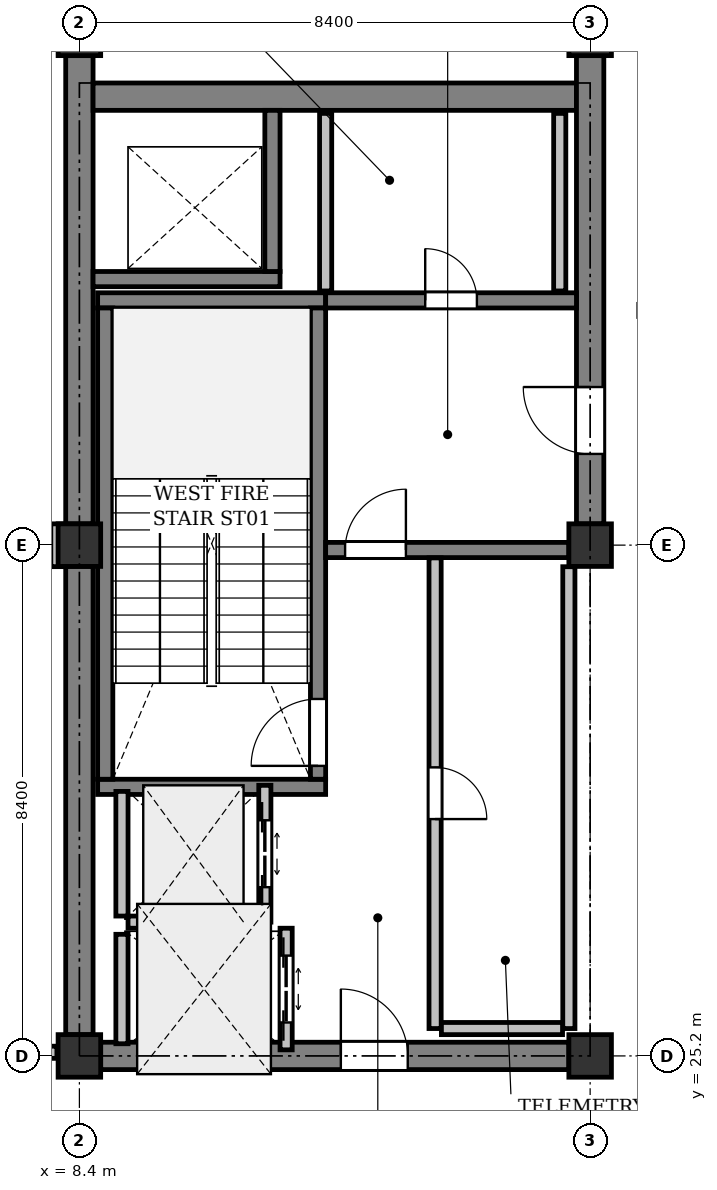
"""IFC4 building model, lengths in metres.
Left out: names, types, materials, properties, quantities, classifications, styles, units other than length and angle.
Written with IfcOpenShell. Run it as: python <this file> out.ifc"""

import sys

from ifc_helpers import new_model, si_unit, direction, frame, frame_2d, origin, origin_2d, place, context, subcontext, project, spatial, rectangle, extrude, element, fill, save


model = new_model("IFC4")
c1 = context("Model", 3, precision=1e-05, world=origin(), true_north=direction((0.0, 1.0)))
c2 = subcontext(c1, "Body", "Model", "MODEL_VIEW")
j1 = project(units=[si_unit("LENGTHUNIT", "METRE"), si_unit("PLANEANGLEUNIT", "RADIAN")], contexts=[c1])
p1 = place(None, origin())
s1 = spatial("IfcSite", under=j1, at=p1, CompositionType="ELEMENT")
p2 = place(p1, origin())
s2 = spatial("IfcBuilding", under=s1, at=p2, CompositionType="ELEMENT")
p3 = place(p2, frame((0.0, 0.0, 322.2)))
s3 = spatial("IfcBuildingStorey", under=s2, at=p3, CompositionType="ELEMENT", Elevation=322.2)
for number, where, z_axis, x_axis in (
    (1, (8.4, 25.2, 0.0), (0.0, 0.0, 1.0), (1.0, 0.0, 0.0)),
    (2, (8.4, 33.6, 0.0), (0.0, 0.0, 1.0), (1.0, 0.0, 0.0)),
    (3, (8.4, 42.0, 0.0), (0.0, 0.0, 1.0), (1.0, 0.0, 0.0)),
    (4, (16.8, 25.2, 0.0), (0.0, 0.0, 1.0), (1.0, 0.0, 0.0)),
    (5, (16.8, 33.6, 0.0), (0.0, 0.0, 1.0), (1.0, 0.0, 0.0)),
    (6, (16.8, 42.0, 0.0), (0.0, 0.0, 1.0), (1.0, 0.0, 0.0)),
):
    element("IfcColumn", number, at=place(p3, frame(where, z_axis=z_axis, x_axis=x_axis)), inside=s3, PredefinedType="COLUMN", context=c2, shape_type="SweptSolid", body=[
        extrude(rectangle(XDim=0.7, YDim=0.7, at=origin_2d()), origin(), (0.0, 0.0, 1.0), 4.8),
    ])
for number, where, z_axis, x_axis in (
    (7, (8.4, 25.55, 0.0), (0.0, 0.0, 1.0), (0.0, 1.0, 0.0)),
    (8, (8.4, 33.95, 0.0), (0.0, 0.0, 1.0), (0.0, 1.0, 0.0)),
):
    element("IfcWall", number, at=place(p3, frame(where, z_axis=z_axis, x_axis=x_axis)), inside=s3, PredefinedType="SHEAR", context=c2, shape_type="SweptSolid", body=[
        extrude(rectangle(XDim=7.7, YDim=0.45, at=frame_2d((3.85, 0.0))), origin(), (0.0, 0.0, 1.0), 4.45),
    ])
p4 = place(p3, frame((8.625, 40.975, 0.0), z_axis=(0.0, 0.0, 1.0), x_axis=(1.0, 0.0, 0.0)))
e9 = element("IfcWall", 9, at=p4, inside=s3, PredefinedType="SHEAR", context=c2, shape_type="SweptSolid", body=[
    extrude(rectangle(XDim=7.95, YDim=0.45, at=frame_2d((3.975, 0.0))), origin(), (0.0, 0.0, 1.0), 4.45),
])
p5 = place(p3, frame((16.8, 33.95, 0.0), z_axis=(0.0, 0.0, 1.0), x_axis=(0.0, 1.0, 0.0)))
e10 = element("IfcWall", 10, at=p5, inside=s3, PredefinedType="SHEAR", context=c2, shape_type="SweptSolid", body=[
    extrude(rectangle(XDim=7.7, YDim=0.45, at=frame_2d((3.85, 0.0))), origin(), (0.0, 0.0, 1.0), 4.45),
])
p6 = place(p5, frame((1.15, 0.0, 0.0)))
e11 = element("IfcOpeningElement", 11, at=p6, cuts=e10, PredefinedType="OPENING", context=c2, shape_type="SweptSolid", body=[
    extrude(rectangle(XDim=1.1, YDim=2.15, at=frame_2d((0.55, 1.075))), frame((0.0, 0.235, 0.0), z_axis=(0.0, -1.0, 0.0), x_axis=(1.0, 0.0, 0.0)), (0.0, 0.0, 1.0), 0.47),
])
p7 = place(p3, frame((8.75, 25.2, 0.0), z_axis=(0.0, 0.0, 1.0), x_axis=(1.0, 0.0, 0.0)))
e12 = element("IfcWall", 12, at=p7, inside=s3, PredefinedType="SHEAR", context=c2, shape_type="SweptSolid", body=[
    extrude(rectangle(XDim=7.7, YDim=0.45, at=frame_2d((3.85, 0.0))), origin(), (0.0, 0.0, 1.0), 4.45),
])
p8 = place(p7, frame((3.95, 0.0, 0.0)))
e13 = element("IfcOpeningElement", 13, at=p8, cuts=e12, PredefinedType="OPENING", context=c2, shape_type="SweptSolid", body=[
    extrude(rectangle(XDim=1.1, YDim=2.15, at=frame_2d((0.55, 1.075))), frame((0.0, 0.235, 0.0), z_axis=(0.0, -1.0, 0.0), x_axis=(1.0, 0.0, 0.0)), (0.0, 0.0, 1.0), 0.47),
])
for number, where, z_axis, x_axis in (
    (14, (12.45, 29.625, 0.0), (0.0, 0.0, 1.0), (-1.0, 0.0, 0.0)),
    (15, (12.45, 37.625, 0.0), (0.0, 0.0, 1.0), (-1.0, 0.0, 0.0)),
):
    element("IfcWall", number, at=place(p3, frame(where, z_axis=z_axis, x_axis=x_axis)), inside=s3, PredefinedType="SHEAR", context=c2, shape_type="SweptSolid", body=[
        extrude(rectangle(XDim=3.75, YDim=0.25, at=frame_2d((1.875, 0.0))), origin(), (0.0, 0.0, 1.0), 4.45),
    ])
p9 = place(p3, frame((12.325, 29.75, 0.0), z_axis=(0.0, 0.0, 1.0), x_axis=(0.0, 1.0, 0.0)))
e16 = element("IfcWall", 16, at=p9, inside=s3, PredefinedType="SHEAR", context=c2, shape_type="SweptSolid", body=[
    extrude(rectangle(XDim=7.75, YDim=0.25, at=frame_2d((3.875, 0.0))), origin(), (0.0, 0.0, 1.0), 4.45),
])
p10 = place(p9, frame((0.22, 0.0, 0.0)))
e17 = element("IfcOpeningElement", 17, at=p10, cuts=e16, PredefinedType="OPENING", context=c2, shape_type="SweptSolid", body=[
    extrude(rectangle(XDim=1.1, YDim=2.15, at=frame_2d((0.55, 1.075))), frame((0.0, 0.135, 0.0), z_axis=(0.0, -1.0, 0.0), x_axis=(1.0, 0.0, 0.0)), (0.0, 0.0, 1.0), 0.27),
])
p11 = place(p3, frame((8.825, 29.75, 0.0), z_axis=(0.0, 0.0, 1.0), x_axis=(0.0, 1.0, 0.0)))
e18 = element("IfcWall", 18, at=p11, inside=s3, PredefinedType="SHEAR", context=c2, shape_type="SweptSolid", body=[
    extrude(rectangle(XDim=7.75, YDim=0.25, at=frame_2d((3.875, 0.0))), origin(), (0.0, 0.0, 1.0), 4.45),
])
p12 = place(p3, frame((8.625, 37.975, 0.0), z_axis=(0.0, 0.0, 1.0), x_axis=(1.0, 0.0, 0.0)))
e19 = element("IfcWall", 19, at=p12, inside=s3, PredefinedType="SHEAR", context=c2, shape_type="SweptSolid", body=[
    extrude(rectangle(XDim=3.075, YDim=0.25, at=frame_2d((1.538, 0.0))), origin(), (0.0, 0.0, 1.0), 4.45),
])
p13 = place(p3, frame((11.575, 38.1, 0.0), z_axis=(0.0, 0.0, 1.0), x_axis=(0.0, 1.0, 0.0)))
e20 = element("IfcWall", 20, at=p13, inside=s3, PredefinedType="SHEAR", context=c2, shape_type="SweptSolid", body=[
    extrude(rectangle(XDim=2.65, YDim=0.25, at=frame_2d((1.325, 0.0))), origin(), (0.0, 0.0, 1.0), 4.45),
])
p14 = place(p3, frame((12.45, 33.52, 0.0), z_axis=(0.0, 0.0, 1.0), x_axis=(1.0, 0.0, 0.0)))
e21 = element("IfcWall", 21, at=p14, inside=s3, PredefinedType="SHEAR", context=c2, shape_type="SweptSolid", body=[
    extrude(rectangle(XDim=4.0, YDim=0.25, at=frame_2d((2.0, 0.0))), origin(), (0.0, 0.0, 1.0), 4.45),
])
p15 = place(p14, frame((0.32, 0.0, 0.0)))
e22 = element("IfcOpeningElement", 22, at=p15, cuts=e21, PredefinedType="OPENING", context=c2, shape_type="SweptSolid", body=[
    extrude(rectangle(XDim=1.0, YDim=2.15, at=frame_2d((0.5, 1.075))), frame((0.0, 0.135, 0.0), z_axis=(0.0, -1.0, 0.0), x_axis=(1.0, 0.0, 0.0)), (0.0, 0.0, 1.0), 0.27),
])
p16 = place(p3, frame((12.45, 37.625, 0.0), z_axis=(0.0, 0.0, 1.0), x_axis=(1.0, 0.0, 0.0)))
e23 = element("IfcWall", 23, at=p16, inside=s3, PredefinedType="SHEAR", context=c2, shape_type="SweptSolid", body=[
    extrude(rectangle(XDim=4.125, YDim=0.25, at=frame_2d((2.062, 0.0))), origin(), (0.0, 0.0, 1.0), 4.45),
])
p17 = place(p16, frame((1.637, 0.0, 0.0)))
e24 = element("IfcOpeningElement", 24, at=p17, cuts=e23, PredefinedType="OPENING", context=c2, shape_type="SweptSolid", body=[
    extrude(rectangle(XDim=0.85, YDim=2.15, at=frame_2d((0.425, 1.075))), frame((0.0, 0.135, 0.0), z_axis=(0.0, -1.0, 0.0), x_axis=(1.0, 0.0, 0.0)), (0.0, 0.0, 1.0), 0.27),
])
p18 = place(p3, frame((11.45, 27.4, 0.0), z_axis=(0.0, 0.0, 1.0), x_axis=(0.0, 1.0, 0.0)))
e25 = element("IfcWall", 25, at=p18, inside=s3, PredefinedType="PARTITIONING", context=c2, shape_type="SweptSolid", body=[
    extrude(rectangle(XDim=2.25, YDim=0.2, at=frame_2d((1.125, 0.0))), origin(), (0.0, 0.0, 1.0), 4.45),
])
p19 = place(p18, frame((0.575, 0.0, 0.0)))
e26 = element("IfcOpeningElement", 26, at=p19, cuts=e25, PredefinedType="OPENING", context=c2, shape_type="SweptSolid", body=[
    extrude(rectangle(XDim=1.1, YDim=2.2, at=frame_2d((0.55, 1.1))), frame((0.0, 0.11, 0.0), z_axis=(0.0, -1.0, 0.0), x_axis=(1.0, 0.0, 0.0)), (0.0, 0.0, 1.0), 0.22),
])
p20 = place(p3, frame((9.1, 27.5, 0.0), z_axis=(0.0, 0.0, 1.0), x_axis=(0.0, 1.0, 0.0)))
e27 = element("IfcWall", 27, at=p20, inside=s3, PredefinedType="PARTITIONING", context=c2, shape_type="SweptSolid", body=[
    extrude(rectangle(XDim=2.05, YDim=0.2, at=frame_2d((1.025, 0.0))), origin(), (0.0, 0.0, 1.0), 4.45),
])
p21 = place(p3, frame((9.2, 27.4, 0.0), z_axis=(0.0, 0.0, 1.0), x_axis=(1.0, 0.0, 0.0)))
e28 = element("IfcWall", 28, at=p21, inside=s3, PredefinedType="PARTITIONING", context=c2, shape_type="SweptSolid", body=[
    extrude(rectangle(XDim=2.15, YDim=0.2, at=frame_2d((1.075, 0.0))), origin(), (0.0, 0.0, 1.0), 4.45),
])
p22 = place(p3, frame((11.8, 25.3, 0.0), z_axis=(0.0, 0.0, 1.0), x_axis=(0.0, 1.0, 0.0)))
e29 = element("IfcWall", 29, at=p22, inside=s3, PredefinedType="PARTITIONING", context=c2, shape_type="SweptSolid", body=[
    extrude(rectangle(XDim=2.0, YDim=0.2, at=frame_2d((1.0, 0.0))), origin(), (0.0, 0.0, 1.0), 4.45),
])
p23 = place(p22, frame((0.45, 0.0, 0.0)))
e30 = element("IfcOpeningElement", 30, at=p23, cuts=e29, PredefinedType="OPENING", context=c2, shape_type="SweptSolid", body=[
    extrude(rectangle(XDim=1.1, YDim=2.2, at=frame_2d((0.55, 1.1))), frame((0.0, 0.11, 0.0), z_axis=(0.0, -1.0, 0.0), x_axis=(1.0, 0.0, 0.0)), (0.0, 0.0, 1.0), 0.22),
])
p24 = place(p3, frame((9.1, 25.4, 0.0), z_axis=(0.0, 0.0, 1.0), x_axis=(0.0, 1.0, 0.0)))
e31 = element("IfcWall", 31, at=p24, inside=s3, PredefinedType="PARTITIONING", context=c2, shape_type="SweptSolid", body=[
    extrude(rectangle(XDim=1.8, YDim=0.2, at=frame_2d((0.9, 0.0))), origin(), (0.0, 0.0, 1.0), 4.45),
])
p25 = place(p3, frame((16.45, 25.65, 0.0), z_axis=(0.0, 0.0, 1.0), x_axis=(0.0, 1.0, 0.0)))
e32 = element("IfcWall", 32, at=p25, inside=s3, PredefinedType="PARTITIONING", context=c2, shape_type="SweptSolid", body=[
    extrude(rectangle(XDim=7.595, YDim=0.2, at=frame_2d((3.798, 0.0))), origin(), (0.0, 0.0, 1.0), 4.45),
])
p26 = place(p3, frame((14.25, 33.39, 0.0), z_axis=(0.0, 0.0, 1.0), x_axis=(0.0, -1.0, 0.0)))
e33 = element("IfcWall", 33, at=p26, inside=s3, PredefinedType="PARTITIONING", context=c2, shape_type="SweptSolid", body=[
    extrude(rectangle(XDim=7.74, YDim=0.2, at=frame_2d((3.87, 0.0))), origin(), (0.0, 0.0, 1.0), 4.45),
])
p27 = place(p26, frame((3.445, 0.0, 0.0)))
e34 = element("IfcOpeningElement", 34, at=p27, cuts=e33, PredefinedType="OPENING", context=c2, shape_type="SweptSolid", body=[
    extrude(rectangle(XDim=0.85, YDim=2.15, at=frame_2d((0.425, 1.075))), frame((0.0, 0.11, 0.0), z_axis=(0.0, -1.0, 0.0), x_axis=(1.0, 0.0, 0.0)), (0.0, 0.0, 1.0), 0.22),
])
p28 = place(p3, frame((14.354, 25.65, 0.0), z_axis=(0.0, 0.0, 1.0), x_axis=(1.0, 0.0, 0.0)))
e35 = element("IfcWall", 35, at=p28, inside=s3, PredefinedType="PARTITIONING", context=c2, shape_type="SweptSolid", body=[
    extrude(rectangle(XDim=1.992, YDim=0.2, at=frame_2d((0.996, 0.0))), origin(), (0.0, 0.0, 1.0), 4.45),
])
for number, where, z_axis, x_axis in (
    (36, (16.3, 37.78, 0.0), (0.0, 0.0, 1.0), (0.0, 1.0, 0.0)),
    (37, (12.45, 40.7, 0.0), (0.0, 0.0, 1.0), (0.0, -1.0, 0.0)),
):
    element("IfcWall", number, at=place(p3, frame(where, z_axis=z_axis, x_axis=x_axis)), inside=s3, PredefinedType="PARTITIONING", context=c2, shape_type="SweptSolid", body=[
        extrude(rectangle(XDim=2.92, YDim=0.2, at=frame_2d((1.46, 0.0))), origin(), (0.0, 0.0, 1.0), 3.5),
    ])
p29 = place(p3, frame((5.4, 25.26, 0.0), z_axis=(0.0, 0.0, 1.0), x_axis=(1.0, 0.0, 0.0)))
e38 = element("IfcWall", 38, at=p29, inside=s3, PredefinedType="PARTITIONING", context=c2, shape_type="SweptSolid", body=[
    extrude(rectangle(XDim=2.63, YDim=0.2, at=frame_2d((1.315, 0.0))), origin(), (0.0, 0.0, 1.0), 4.091),
])
p30 = place(p3, frame((8.031, 33.246, 0.0), z_axis=(0.0, 0.0, 1.0), x_axis=(-0.000693721651, 0.999999759375, 0.0)))
e39 = element("IfcWall", 39, at=p30, inside=s3, PredefinedType="PARTITIONING", context=c2, shape_type="SweptSolid", body=[
    extrude(rectangle(XDim=0.704, YDim=0.2, at=frame_2d((0.352, 0.0))), origin(), (0.0, 0.0, 1.0), 4.091),
])
p31 = place(p6, origin())
e40 = element("IfcDoor", 40, at=p31, inside=s3, OperationType="SINGLE_SWING_RIGHT", PredefinedType="DOOR", context=c2, shape_type="SweptSolid", body=[
    extrude(rectangle(XDim=1.1, YDim=2.15, at=frame_2d((0.55, 1.075))), frame((0.0, 0.025, 0.0), z_axis=(0.0, -1.0, 0.0), x_axis=(1.0, 0.0, 0.0)), (0.0, 0.0, 1.0), 0.05),
])
fill(e11, e40)
p32 = place(p8, origin())
e41 = element("IfcDoor", 41, at=p32, inside=s3, OperationType="SINGLE_SWING_LEFT", PredefinedType="DOOR", context=c2, shape_type="SweptSolid", body=[
    extrude(rectangle(XDim=1.1, YDim=2.15, at=frame_2d((0.55, 1.075))), frame((0.0, 0.025, 0.0), z_axis=(0.0, -1.0, 0.0), x_axis=(1.0, 0.0, 0.0)), (0.0, 0.0, 1.0), 0.05),
])
fill(e13, e41)
p33 = place(p10, origin())
e42 = element("IfcDoor", 42, at=p33, inside=s3, OperationType="SINGLE_SWING_LEFT", PredefinedType="DOOR", context=c2, shape_type="SweptSolid", body=[
    extrude(rectangle(XDim=1.1, YDim=2.15, at=frame_2d((0.55, 1.075))), frame((0.0, 0.025, 0.0), z_axis=(0.0, -1.0, 0.0), x_axis=(1.0, 0.0, 0.0)), (0.0, 0.0, 1.0), 0.05),
])
fill(e17, e42)
p34 = place(p15, origin())
e43 = element("IfcDoor", 43, at=p34, inside=s3, OperationType="SINGLE_SWING_RIGHT", PredefinedType="DOOR", context=c2, shape_type="SweptSolid", body=[
    extrude(rectangle(XDim=1.0, YDim=2.15, at=frame_2d((0.5, 1.075))), frame((0.0, 0.025, 0.0), z_axis=(0.0, -1.0, 0.0), x_axis=(1.0, 0.0, 0.0)), (0.0, 0.0, 1.0), 0.05),
])
fill(e22, e43)
p35 = place(p19, origin())
e44 = element("IfcDoor", 44, at=p35, inside=s3, OperationType="DOUBLE_DOOR_SLIDING", PredefinedType="DOOR", context=c2, shape_type="SweptSolid", body=[
    extrude(rectangle(XDim=1.1, YDim=2.2, at=frame_2d((0.55, 1.1))), frame((0.0, 0.025, 0.0), z_axis=(0.0, -1.0, 0.0), x_axis=(1.0, 0.0, 0.0)), (0.0, 0.0, 1.0), 0.05),
])
fill(e26, e44)
p36 = place(p23, origin())
e45 = element("IfcDoor", 45, at=p36, inside=s3, OperationType="DOUBLE_DOOR_SLIDING", PredefinedType="DOOR", context=c2, shape_type="SweptSolid", body=[
    extrude(rectangle(XDim=1.1, YDim=2.2, at=frame_2d((0.55, 1.1))), frame((0.0, 0.025, 0.0), z_axis=(0.0, -1.0, 0.0), x_axis=(1.0, 0.0, 0.0)), (0.0, 0.0, 1.0), 0.05),
])
fill(e30, e45)
p37 = place(p27, origin())
e46 = element("IfcDoor", 46, at=p37, inside=s3, OperationType="SINGLE_SWING_RIGHT", PredefinedType="DOOR", context=c2, shape_type="SweptSolid", body=[
    extrude(rectangle(XDim=0.85, YDim=2.15, at=frame_2d((0.425, 1.075))), frame((0.0, 0.025, 0.0), z_axis=(0.0, -1.0, 0.0), x_axis=(1.0, 0.0, 0.0)), (0.0, 0.0, 1.0), 0.05),
])
fill(e34, e46)
p38 = place(p17, origin())
e47 = element("IfcDoor", 47, at=p38, inside=s3, OperationType="SINGLE_SWING_LEFT", PredefinedType="DOOR", context=c2, shape_type="SweptSolid", body=[
    extrude(rectangle(XDim=0.85, YDim=2.15, at=frame_2d((0.425, 1.075))), frame((0.0, 0.025, 0.0), z_axis=(0.0, -1.0, 0.0), x_axis=(1.0, 0.0, 0.0)), (0.0, 0.0, 1.0), 0.05),
])
fill(e24, e47)
save(model, sys.argv[1])
